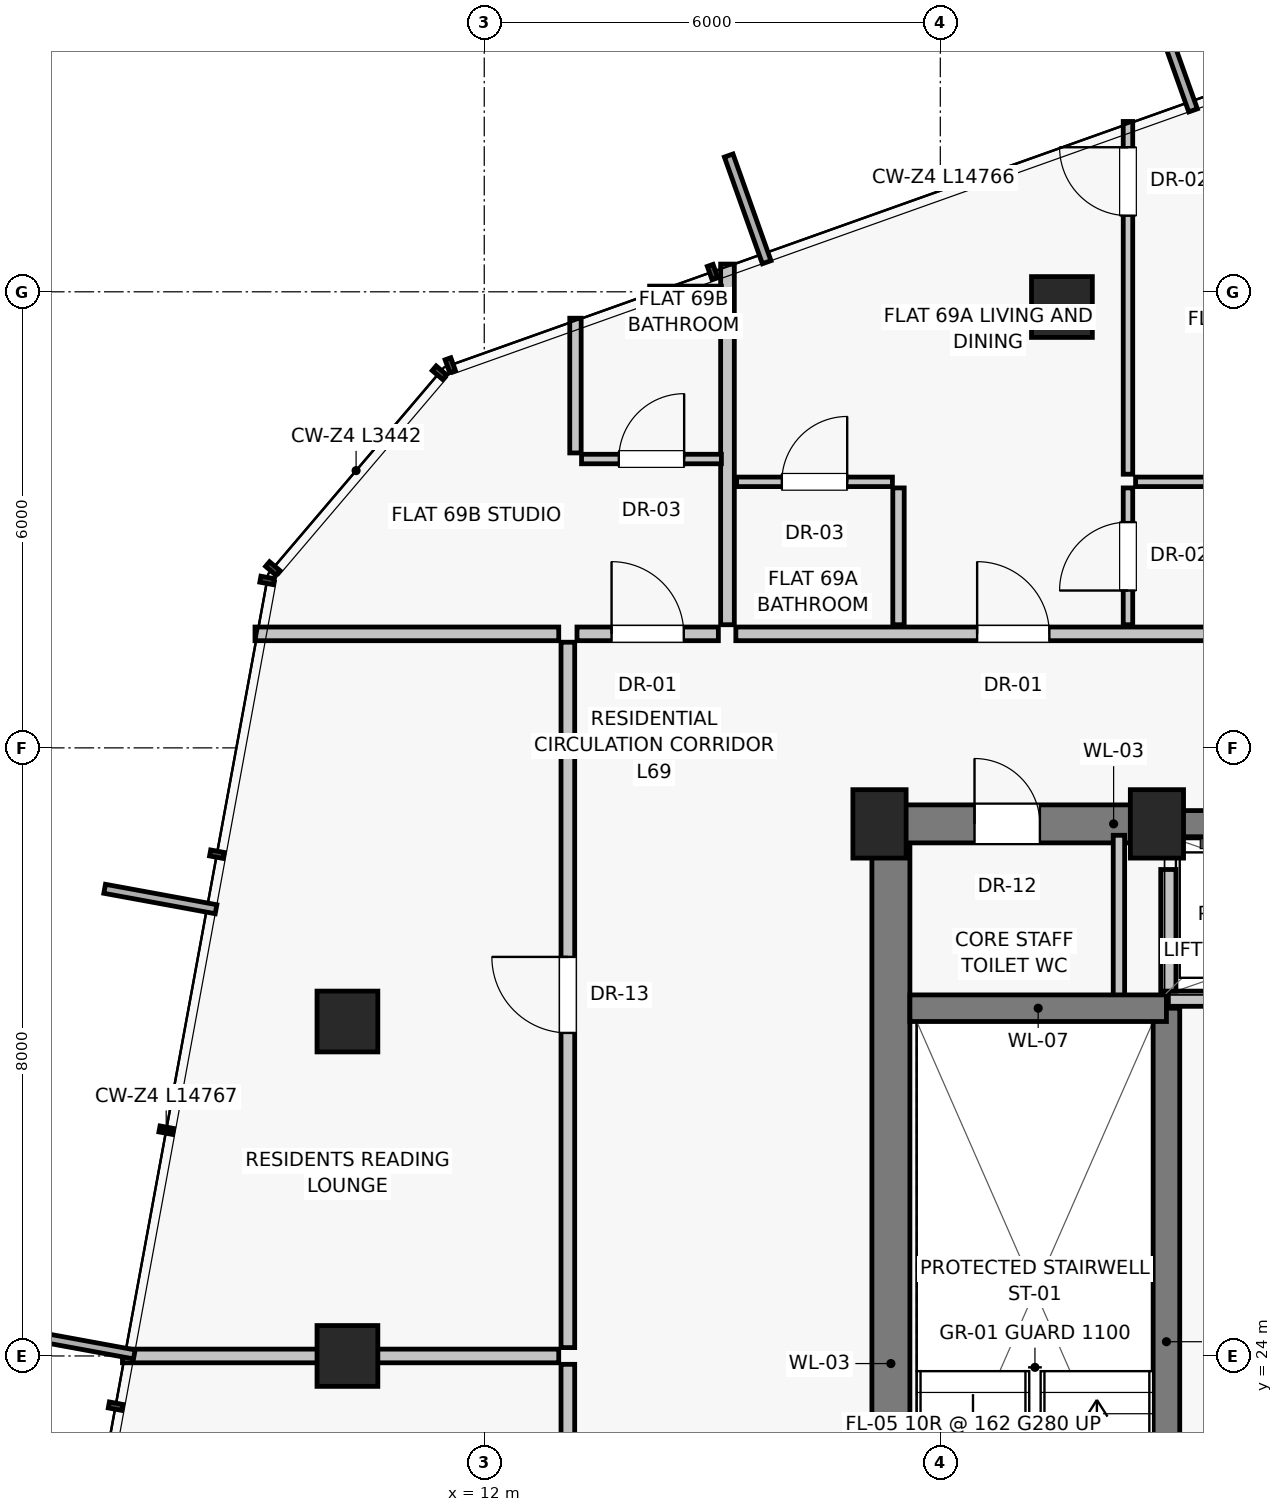
"""IFC4 building model, lengths in metres.
Left out: names, types, materials, properties, quantities, classifications, styles, units other than length and angle.
Written with IfcOpenShell. Run it as: python <this file> out.ifc"""

import sys

from ifc_helpers import new_model, si_unit, direction, frame, frame_2d, origin, origin_2d, place, context, subcontext, project, spatial, rectangle, extrude, source, transform, mapped, element, fill, save


model = new_model("IFC4")
c1 = context("Model", 3, precision=1e-05, world=origin(), true_north=direction((0.0, 1.0)))
c2 = subcontext(c1, "Body", "Model", "MODEL_VIEW")
j1 = project(units=[si_unit("LENGTHUNIT", "METRE"), si_unit("PLANEANGLEUNIT", "RADIAN")], contexts=[c1])
p1 = place(None, origin())
s1 = spatial("IfcSite", under=j1, at=p1, CompositionType="ELEMENT")
p2 = place(p1, origin())
s2 = spatial("IfcBuilding", under=s1, at=p2, CompositionType="ELEMENT")
p3 = place(p2, frame((0.0, 0.0, 244.75)))
s3 = spatial("IfcBuildingStorey", under=s2, at=p3, CompositionType="ELEMENT", Elevation=244.75)
for number, where, z_axis, x_axis in (
    (1, (17.2, 31.0, 0.0), (0.0, 0.0, 1.0), (1.0, 0.0, 0.0)),
    (2, (20.85, 31.0, 0.0), (0.0, 0.0, 1.0), (1.0, 0.0, 0.0)),
):
    element("IfcColumn", number, at=place(p3, frame(where, z_axis=z_axis, x_axis=x_axis)), inside=s3, PredefinedType="PILASTER", context=c2, shape_type="SweptSolid", body=[
        extrude(rectangle(XDim=0.7, YDim=0.9, at=origin_2d()), origin(), (0.0, 0.0, 1.0), 3.25),
    ])
for number, where, z_axis, x_axis in (
    (3, (19.6, 37.8, 0.0), (0.0, 0.0, 1.0), (1.0, 0.0, 0.0)),
    (4, (10.2, 28.4, 0.0), (0.0, 0.0, 1.0), (1.0, 0.0, 0.0)),
    (5, (10.2, 24.0, 0.0), (0.0, 0.0, 1.0), (1.0, 0.0, 0.0)),
):
    element("IfcColumn", number, at=place(p3, frame(where, z_axis=z_axis, x_axis=x_axis)), inside=s3, PredefinedType="COLUMN", context=c2, shape_type="SweptSolid", body=[
        extrude(rectangle(XDim=0.8, YDim=0.8, at=origin_2d()), origin(), (0.0, 0.0, 1.0), 3.25),
    ])
p4 = place(p3, frame((17.35, 16.8, 0.0), z_axis=(0.0, 0.0, 1.0), x_axis=(0.0, 1.0, 0.0)))
e6 = element("IfcWall", 6, at=p4, inside=s3, PredefinedType="SHEAR", context=c2, shape_type="SweptSolid", body=[
    extrude(rectangle(XDim=14.2, YDim=0.5, at=frame_2d((7.1, 0.0))), origin(), (0.0, 0.0, 1.0), 3.015),
])
p5 = place(p3, frame((17.2, 31.0, 0.0), z_axis=(0.0, 0.0, 1.0), x_axis=(1.0, 0.0, 0.0)))
e7 = element("IfcWall", 7, at=p5, inside=s3, PredefinedType="SHEAR", context=c2, shape_type="SweptSolid", body=[
    extrude(rectangle(XDim=3.8, YDim=0.5, at=frame_2d((1.9, 0.0))), origin(), (0.0, 0.0, 1.0), 3.015),
])
p6 = place(p5, frame((1.25, 0.0, 0.0)))
e8 = element("IfcOpeningElement", 8, at=p6, cuts=e7, PredefinedType="OPENING", context=c2, shape_type="SweptSolid", body=[
    extrude(rectangle(XDim=0.86, YDim=2.01, at=frame_2d((0.43, 1.005))), frame((0.0, 0.26, 0.0), z_axis=(0.0, -1.0, 0.0), x_axis=(1.0, 0.0, 0.0)), (0.0, 0.0, 1.0), 0.52),
])
p7 = place(p3, frame((21.0, 31.0, 0.0), z_axis=(0.0, 0.0, 1.0), x_axis=(1.0, 0.0, 0.0)))
e9 = element("IfcWall", 9, at=p7, inside=s3, PredefinedType="SHEAR", context=c2, shape_type="SweptSolid", body=[
    extrude(rectangle(XDim=6.0, YDim=0.35, at=frame_2d((3.0, 0.0))), origin(), (0.0, 0.0, 1.0), 3.015),
])
p8 = place(p7, frame((0.5, 0.0, 0.0)))
e10 = element("IfcOpeningElement", 10, at=p8, cuts=e9, PredefinedType="OPENING", context=c2, shape_type="SweptSolid", body=[
    extrude(rectangle(XDim=1.1, YDim=2.08, at=frame_2d((0.55, 1.04))), frame((0.0, 0.185, 0.0), z_axis=(0.0, -1.0, 0.0), x_axis=(1.0, 0.0, 0.0)), (0.0, 0.0, 1.0), 0.37),
])
p9 = place(p7, frame((2.45, 0.0, 0.0)))
e11 = element("IfcOpeningElement", 11, at=p9, cuts=e9, PredefinedType="OPENING", context=c2, shape_type="SweptSolid", body=[
    extrude(rectangle(XDim=1.1, YDim=2.08, at=frame_2d((0.55, 1.04))), frame((0.0, 0.185, 0.0), z_axis=(0.0, -1.0, 0.0), x_axis=(1.0, 0.0, 0.0)), (0.0, 0.0, 1.0), 0.37),
])
p10 = place(p7, frame((4.4, 0.0, 0.0)))
e12 = element("IfcOpeningElement", 12, at=p10, cuts=e9, PredefinedType="OPENING", context=c2, shape_type="SweptSolid", body=[
    extrude(rectangle(XDim=1.1, YDim=2.08, at=frame_2d((0.55, 1.04))), frame((0.0, 0.185, 0.0), z_axis=(0.0, -1.0, 0.0), x_axis=(1.0, 0.0, 0.0)), (0.0, 0.0, 1.0), 0.37),
])
p11 = place(p3, frame((20.35, 28.65, 0.0), z_axis=(0.0, 0.0, 1.0), x_axis=(0.0, 1.0, 0.0)))
e13 = element("IfcWall", 13, at=p11, inside=s3, PredefinedType="PARTITIONING", context=c2, shape_type="SweptSolid", body=[
    extrude(rectangle(XDim=2.2, YDim=0.15, at=frame_2d((1.1, 0.0))), origin(), (0.0, 0.0, 1.0), 3.015),
])
p12 = place(p3, frame((20.975, 19.8, 0.0), z_axis=(0.0, 0.0, 1.0), x_axis=(0.0, 1.0, 0.0)))
e14 = element("IfcWall", 14, at=p12, inside=s3, PredefinedType="SHEAR", context=c2, shape_type="SweptSolid", body=[
    extrude(rectangle(XDim=8.775, YDim=0.35, at=frame_2d((4.387, 0.0))), origin(), (0.0, 0.0, 1.0), 3.015),
])
p13 = place(p3, frame((17.6, 28.575, 0.0), z_axis=(0.0, 0.0, 1.0), x_axis=(1.0, 0.0, 0.0)))
e15 = element("IfcWall", 15, at=p13, inside=s3, PredefinedType="SHEAR", context=c2, shape_type="SweptSolid", body=[
    extrude(rectangle(XDim=3.375, YDim=0.35, at=frame_2d((1.688, 0.0))), origin(), (0.0, 0.0, 1.0), 3.015),
])
p14 = place(p3, frame((21.0, 28.7, 0.0), z_axis=(0.0, 0.0, 1.0), x_axis=(1.0, 0.0, 0.0)))
e16 = element("IfcWall", 16, at=p14, inside=s3, PredefinedType="SOLIDWALL", context=c2, shape_type="SweptSolid", body=[
    extrude(rectangle(XDim=6.0, YDim=0.2, at=frame_2d((3.0, 0.0))), origin(), (0.0, 0.0, 1.0), 3.015),
])
p15 = place(p3, frame((21.0, 28.8, 0.0), z_axis=(0.0, 0.0, 1.0), x_axis=(0.0, 1.0, 0.0)))
e17 = element("IfcWall", 17, at=p15, inside=s3, PredefinedType="SOLIDWALL", context=c2, shape_type="SweptSolid", body=[
    extrude(rectangle(XDim=1.6, YDim=0.2, at=frame_2d((0.8, 0.0))), origin(), (0.0, 0.0, 1.0), 3.015),
])
p16 = place(p3, frame((15.2, 33.62, 0.0), z_axis=(0.0, 0.0, 1.0), x_axis=(0.0, 1.0, 0.0)))
e18 = element("IfcWall", 18, at=p16, inside=s3, PredefinedType="PARTITIONING", context=c2, shape_type="SweptSolid", body=[
    extrude(rectangle(XDim=4.745, YDim=0.18, at=frame_2d((2.372, 0.0))), origin(), (0.0, 0.0, 1.0), 3.015),
])
p17 = place(p3, frame((15.31, 33.5, 0.0), z_axis=(0.0, 0.0, 1.0), x_axis=(1.0, 0.0, 0.0)))
e19 = element("IfcWall", 19, at=p17, inside=s3, PredefinedType="PARTITIONING", context=c2, shape_type="SweptSolid", body=[
    extrude(rectangle(XDim=9.36, YDim=0.18, at=frame_2d((4.68, 0.0))), origin(), (0.0, 0.0, 1.0), 3.015),
])
p18 = place(p17, frame((3.175, 0.0, 0.0)))
e20 = element("IfcOpeningElement", 20, at=p18, cuts=e19, PredefinedType="OPENING", context=c2, shape_type="SweptSolid", body=[
    extrude(rectangle(XDim=0.95, YDim=2.02, at=frame_2d((0.475, 1.01))), frame((0.0, 0.1, 0.0), z_axis=(0.0, -1.0, 0.0), x_axis=(1.0, 0.0, 0.0)), (0.0, 0.0, 1.0), 0.2),
])
p19 = place(p3, frame((17.45, 33.62, 0.0), z_axis=(0.0, 0.0, 1.0), x_axis=(0.0, 1.0, 0.0)))
e21 = element("IfcWall", 21, at=p19, inside=s3, PredefinedType="PARTITIONING", context=c2, shape_type="SweptSolid", body=[
    extrude(rectangle(XDim=1.8, YDim=0.15, at=frame_2d((0.9, 0.0))), origin(), (0.0, 0.0, 1.0), 3.015),
])
p20 = place(p3, frame((15.32, 35.5, 0.0), z_axis=(0.0, 0.0, 1.0), x_axis=(1.0, 0.0, 0.0)))
e22 = element("IfcWall", 22, at=p20, inside=s3, PredefinedType="PARTITIONING", context=c2, shape_type="SweptSolid", body=[
    extrude(rectangle(XDim=2.05, YDim=0.125, at=frame_2d((1.025, 0.0))), origin(), (0.0, 0.0, 1.0), 3.015),
])
p21 = place(p20, frame((0.595, 0.0, 0.0)))
e23 = element("IfcOpeningElement", 23, at=p21, cuts=e22, PredefinedType="OPENING", context=c2, shape_type="SweptSolid", body=[
    extrude(rectangle(XDim=0.86, YDim=2.01, at=frame_2d((0.43, 1.005))), frame((0.0, 0.073, 0.0), z_axis=(0.0, -1.0, 0.0), x_axis=(1.0, 0.0, 0.0)), (0.0, 0.0, 1.0), 0.145),
])
p22 = place(p3, frame((20.469, 33.62, 0.0), z_axis=(0.0, 0.0, 1.0), x_axis=(0.0, 1.0, 0.0)))
e24 = element("IfcWall", 24, at=p22, inside=s3, PredefinedType="PARTITIONING", context=c2, shape_type="SweptSolid", body=[
    extrude(rectangle(XDim=1.8, YDim=0.125, at=frame_2d((0.9, 0.0))), origin(), (0.0, 0.0, 1.0), 2.543),
])
p23 = place(p22, frame((0.45, 0.0, 0.0)))
e25 = element("IfcOpeningElement", 25, at=p23, cuts=e24, PredefinedType="OPENING", context=c2, shape_type="SweptSolid", body=[
    extrude(rectangle(XDim=0.9, YDim=2.01, at=frame_2d((0.45, 1.005))), frame((0.0, 0.073, 0.0), z_axis=(0.0, -1.0, 0.0), x_axis=(1.0, 0.0, 0.0)), (0.0, 0.0, 1.0), 0.145),
])
p24 = place(p3, frame((20.569, 35.5, 0.0), z_axis=(0.0, 0.0, 1.0), x_axis=(1.0, 0.0, 0.0)))
e26 = element("IfcWall", 26, at=p24, inside=s3, PredefinedType="PARTITIONING", context=c2, shape_type="SweptSolid", body=[
    extrude(rectangle(XDim=4.091, YDim=0.125, at=frame_2d((2.045, 0.0))), origin(), (0.0, 0.0, 1.0), 3.015),
])
p25 = place(p3, frame((20.469, 35.6, 0.0), z_axis=(0.0, 0.0, 1.0), x_axis=(0.0, 1.0, 0.0)))
e27 = element("IfcWall", 27, at=p25, inside=s3, PredefinedType="PARTITIONING", context=c2, shape_type="SweptSolid", body=[
    extrude(rectangle(XDim=4.641, YDim=0.125, at=frame_2d((2.32, 0.0))), origin(), (0.0, 0.0, 1.0), 2.543),
])
p26 = place(p25, frame((3.402, 0.0, 0.0)))
e28 = element("IfcOpeningElement", 28, at=p26, cuts=e27, PredefinedType="OPENING", context=c2, shape_type="SweptSolid", body=[
    extrude(rectangle(XDim=0.9, YDim=2.01, at=frame_2d((0.45, 1.005))), frame((0.0, 0.073, 0.0), z_axis=(0.0, -1.0, 0.0), x_axis=(1.0, 0.0, 0.0)), (0.0, 0.0, 1.0), 0.145),
])
p27 = place(p3, frame((12.98, 33.5, 0.0), z_axis=(0.0, 0.0, 1.0), x_axis=(-1.0, 0.0, 0.0)))
e29 = element("IfcWall", 29, at=p27, inside=s3, PredefinedType="PARTITIONING", context=c2, shape_type="SweptSolid", body=[
    extrude(rectangle(XDim=3.996, YDim=0.18, at=frame_2d((1.998, 0.0))), origin(), (0.0, 0.0, 1.0), 3.015),
])
p28 = place(p3, frame((13.1, 19.26, 0.0), z_axis=(0.0, 0.0, 1.0), x_axis=(0.0, 1.0, 0.0)))
e30 = element("IfcWall", 30, at=p28, inside=s3, PredefinedType="PARTITIONING", context=c2, shape_type="SweptSolid", body=[
    extrude(rectangle(XDim=4.63, YDim=0.18, at=frame_2d((2.315, 0.0))), origin(), (0.0, 0.0, 1.0), 2.662),
])
p29 = place(p28, frame((1.815, 0.0, 0.0)))
e31 = element("IfcOpeningElement", 31, at=p29, cuts=e30, PredefinedType="OPENING", context=c2, shape_type="SweptSolid", body=[
    extrude(rectangle(XDim=1.0, YDim=2.01, at=frame_2d((0.5, 1.005))), frame((0.0, 0.1, 0.0), z_axis=(0.0, -1.0, 0.0), x_axis=(1.0, 0.0, 0.0)), (0.0, 0.0, 1.0), 0.2),
])
p30 = place(p3, frame((13.1, 24.11, 0.0), z_axis=(0.0, 0.0, 1.0), x_axis=(0.0, 1.0, 0.0)))
e32 = element("IfcWall", 32, at=p30, inside=s3, PredefinedType="PARTITIONING", context=c2, shape_type="SweptSolid", body=[
    extrude(rectangle(XDim=9.28, YDim=0.18, at=frame_2d((4.64, 0.0))), origin(), (0.0, 0.0, 1.0), 2.662),
])
p31 = place(p30, frame((4.14, 0.0, 0.0)))
e33 = element("IfcOpeningElement", 33, at=p31, cuts=e32, PredefinedType="OPENING", context=c2, shape_type="SweptSolid", body=[
    extrude(rectangle(XDim=1.0, YDim=2.01, at=frame_2d((0.5, 1.005))), frame((0.0, 0.1, 0.0), z_axis=(0.0, -1.0, 0.0), x_axis=(1.0, 0.0, 0.0)), (0.0, 0.0, 1.0), 0.2),
])
p32 = place(p3, frame((12.98, 24.0, 0.0), z_axis=(0.0, 0.0, 1.0), x_axis=(-1.0, 0.0, 0.0)))
e34 = element("IfcWall", 34, at=p32, inside=s3, PredefinedType="PARTITIONING", context=c2, shape_type="SweptSolid", body=[
    extrude(rectangle(XDim=5.74, YDim=0.18, at=frame_2d((2.87, 0.0))), origin(), (0.0, 0.0, 1.0), 3.015),
])
p33 = place(p3, frame((13.22, 33.5, 0.0), z_axis=(0.0, 0.0, 1.0), x_axis=(1.0, 0.0, 0.0)))
e35 = element("IfcWall", 35, at=p33, inside=s3, PredefinedType="PARTITIONING", context=c2, shape_type="SweptSolid", body=[
    extrude(rectangle(XDim=1.86, YDim=0.18, at=frame_2d((0.93, 0.0))), origin(), (0.0, 0.0, 1.0), 3.015),
])
p34 = place(p33, frame((0.455, 0.0, 0.0)))
e36 = element("IfcOpeningElement", 36, at=p34, cuts=e35, PredefinedType="OPENING", context=c2, shape_type="SweptSolid", body=[
    extrude(rectangle(XDim=0.95, YDim=2.02, at=frame_2d((0.475, 1.01))), frame((0.0, 0.1, 0.0), z_axis=(0.0, -1.0, 0.0), x_axis=(1.0, 0.0, 0.0)), (0.0, 0.0, 1.0), 0.2),
])
p35 = place(p3, frame((13.28, 35.8, 0.0), z_axis=(0.0, 0.0, 1.0), x_axis=(1.0, 0.0, 0.0)))
e37 = element("IfcWall", 37, at=p35, inside=s3, PredefinedType="PARTITIONING", context=c2, shape_type="SweptSolid", body=[
    extrude(rectangle(XDim=1.84, YDim=0.125, at=frame_2d((0.92, 0.0))), origin(), (0.0, 0.0, 1.0), 3.015),
])
p36 = place(p35, frame((0.49, 0.0, 0.0)))
e38 = element("IfcOpeningElement", 38, at=p36, cuts=e37, PredefinedType="OPENING", context=c2, shape_type="SweptSolid", body=[
    extrude(rectangle(XDim=0.86, YDim=2.01, at=frame_2d((0.43, 1.005))), frame((0.0, 0.073, 0.0), z_axis=(0.0, -1.0, 0.0), x_axis=(1.0, 0.0, 0.0)), (0.0, 0.0, 1.0), 0.145),
])
p37 = place(p3, frame((14.176, 38.0, 0.0), z_axis=(0.0, 0.0, 1.0), x_axis=(1.0, 0.0, 0.0)))
e39 = element("IfcWall", 39, at=p37, inside=s3, PredefinedType="PARTITIONING", context=c2, shape_type="SweptSolid", body=[
    extrude(rectangle(XDim=0.945, YDim=0.15, at=frame_2d((0.472, 0.0))), origin(), (0.0, 0.0, 1.0), 3.015),
])
p38 = place(p3, frame((13.2, 35.88, 0.0), z_axis=(0.0, 0.0, 1.0), x_axis=(0.0, 1.0, 0.0)))
e40 = element("IfcWall", 40, at=p38, inside=s3, PredefinedType="PARTITIONING", context=c2, shape_type="SweptSolid", body=[
    extrude(rectangle(XDim=1.773, YDim=0.15, at=frame_2d((0.886, 0.0))), origin(), (0.0, 0.0, 1.0), 3.015),
])
m1 = source(origin(), c2, "Body", "SweptSolid", [
    extrude(rectangle(XDim=0.86, YDim=2.01, at=frame_2d((0.43, 1.005))), frame((0.0, 0.025, 0.0), z_axis=(0.0, -1.0, 0.0), x_axis=(1.0, 0.0, 0.0)), (0.0, 0.0, 1.0), 0.05),
])
p39 = place(p6, origin())
e41 = element("IfcDoor", 41, at=p39, inside=s3, OperationType="SINGLE_SWING_LEFT", PredefinedType="DOOR", context=c2, shape_type="MappedRepresentation", body=[
    mapped(m1, transform((0.0, 0.0, 0.0), scale=1.0)),
])
fill(e8, e41)
m2 = source(origin(), c2, "Body", "SweptSolid", [
    extrude(rectangle(XDim=0.95, YDim=2.02, at=frame_2d((0.475, 1.01))), frame((0.0, 0.025, 0.0), z_axis=(0.0, -1.0, 0.0), x_axis=(1.0, 0.0, 0.0)), (0.0, 0.0, 1.0), 0.05),
])
p40 = place(p18, origin())
e42 = element("IfcDoor", 42, at=p40, inside=s3, OperationType="SINGLE_SWING_LEFT", PredefinedType="DOOR", context=c2, shape_type="MappedRepresentation", body=[
    mapped(m2, transform((0.0, 0.0, 0.0), scale=1.0)),
])
fill(e20, e42)
p41 = place(p21, origin())
e43 = element("IfcDoor", 43, at=p41, inside=s3, OperationType="SINGLE_SWING_RIGHT", PredefinedType="DOOR", context=c2, shape_type="MappedRepresentation", body=[
    mapped(m1, transform((0.0, 0.0, 0.0), scale=1.0)),
])
fill(e23, e43)
m3 = source(origin(), c2, "Body", "SweptSolid", [
    extrude(rectangle(XDim=0.9, YDim=2.01, at=frame_2d((0.45, 1.005))), frame((0.0, 0.025, 0.0), z_axis=(0.0, -1.0, 0.0), x_axis=(1.0, 0.0, 0.0)), (0.0, 0.0, 1.0), 0.05),
])
p42 = place(p23, origin())
e44 = element("IfcDoor", 44, at=p42, inside=s3, OperationType="SINGLE_SWING_LEFT", PredefinedType="DOOR", context=c2, shape_type="MappedRepresentation", body=[
    mapped(m3, transform((0.0, 0.0, 0.0), scale=1.0)),
])
fill(e25, e44)
p43 = place(p26, origin())
e45 = element("IfcDoor", 45, at=p43, inside=s3, OperationType="SINGLE_SWING_RIGHT", PredefinedType="DOOR", context=c2, shape_type="MappedRepresentation", body=[
    mapped(m3, transform((0.0, 0.0, 0.0), scale=1.0)),
])
fill(e28, e45)
m4 = source(origin(), c2, "Body", "SweptSolid", [
    extrude(rectangle(XDim=1.0, YDim=2.01, at=frame_2d((0.5, 1.005))), frame((0.0, 0.025, 0.0), z_axis=(0.0, -1.0, 0.0), x_axis=(1.0, 0.0, 0.0)), (0.0, 0.0, 1.0), 0.05),
])
p44 = place(p31, origin())
e46 = element("IfcDoor", 46, at=p44, inside=s3, OperationType="SINGLE_SWING_RIGHT", PredefinedType="DOOR", context=c2, shape_type="MappedRepresentation", body=[
    mapped(m4, transform((0.0, 0.0, 0.0), scale=1.0)),
])
fill(e33, e46)
p45 = place(p34, origin())
e47 = element("IfcDoor", 47, at=p45, inside=s3, OperationType="SINGLE_SWING_LEFT", PredefinedType="DOOR", context=c2, shape_type="MappedRepresentation", body=[
    mapped(m2, transform((0.0, 0.0, 0.0), scale=1.0)),
])
fill(e36, e47)
p46 = place(p36, origin())
e48 = element("IfcDoor", 48, at=p46, inside=s3, OperationType="SINGLE_SWING_RIGHT", PredefinedType="DOOR", context=c2, shape_type="MappedRepresentation", body=[
    mapped(m1, transform((0.0, 0.0, 0.0), scale=1.0)),
])
fill(e38, e48)
save(model, sys.argv[1])
